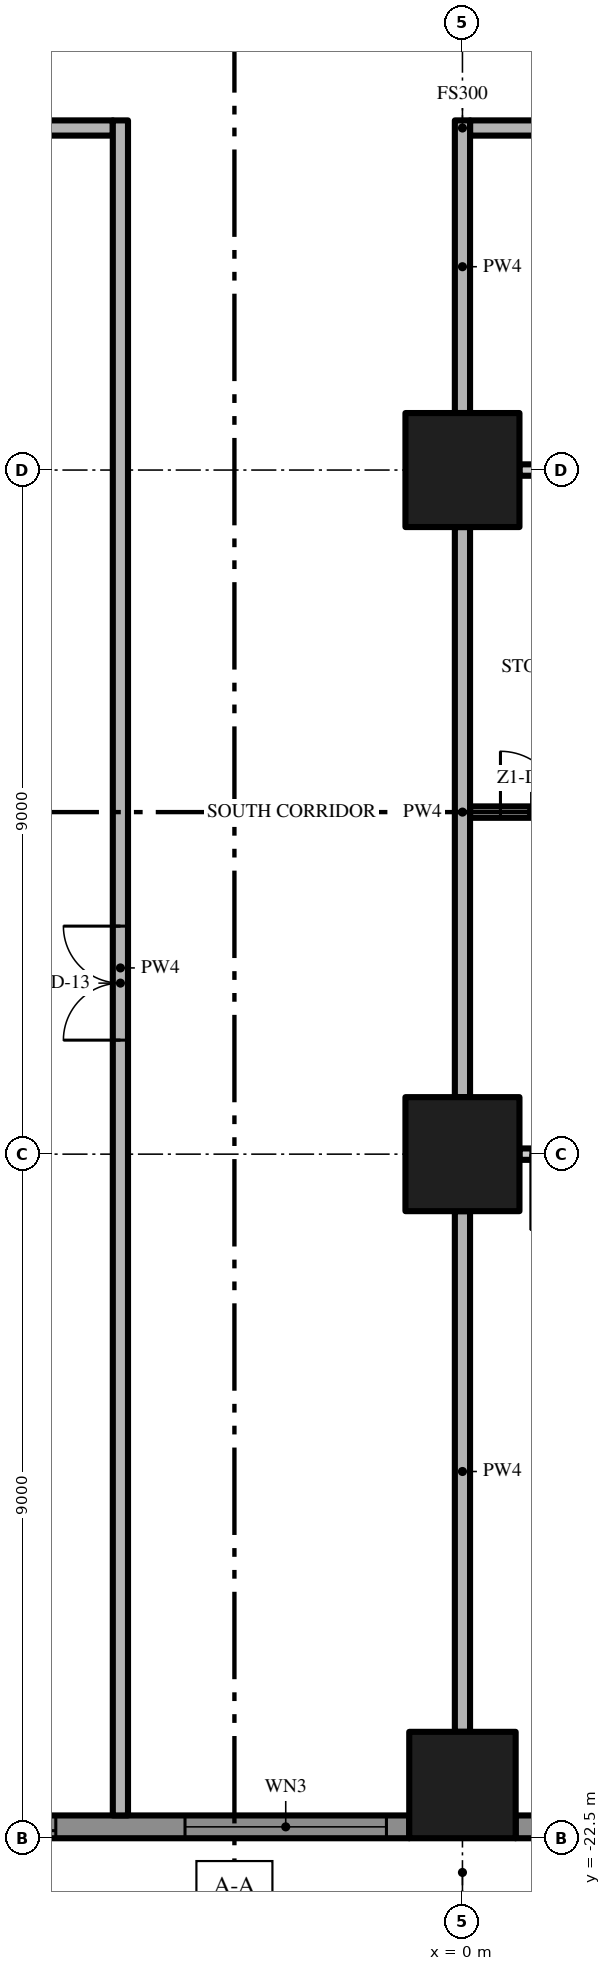
"""IFC4 building model, lengths in metres.
Left out: names, types, materials, properties, quantities, classifications, styles, units other than length and angle.
Written with IfcOpenShell. Run it as: python <this file> out.ifc"""

import sys

from ifc_helpers import new_model, si_unit, direction, frame, frame_2d, origin, origin_2d, place, context, subcontext, project, spatial, polyline, rectangle, outline, extrude, element, fill, save


model = new_model("IFC4")
c1 = context("Model", 3, precision=1e-05, world=origin(), true_north=direction((0.0, 1.0)))
c2 = subcontext(c1, "Body", "Model", "MODEL_VIEW")
j1 = project(units=[si_unit("LENGTHUNIT", "METRE"), si_unit("PLANEANGLEUNIT", "RADIAN")], contexts=[c1])
p1 = place(None, origin())
s1 = spatial("IfcSite", under=j1, at=p1, CompositionType="ELEMENT")
p2 = place(p1, origin())
s2 = spatial("IfcBuilding", under=s1, at=p2, CompositionType="ELEMENT")
p3 = place(p2, frame((0.0, 0.0, 49.2)))
s3 = spatial("IfcBuildingStorey", under=s2, at=p3, CompositionType="ELEMENT", Elevation=49.2)
p4 = place(p3, frame((0.0, -13.5, 0.0), z_axis=(0.0, 0.0, 1.0), x_axis=(1.0, 0.0, 0.0)))
e1 = element("IfcColumn", 1, at=p4, inside=s3, PredefinedType="COLUMN", context=c2, shape_type="SweptSolid", body=[
    extrude(rectangle(XDim=1.5, YDim=1.5, at=origin_2d()), origin(), (0.0, 0.0, 1.0), 3.5),
])
p5 = place(p3, frame((0.0, -21.8, 0.0), z_axis=(0.0, 0.0, 1.0), x_axis=(1.0, 0.0, 0.0)))
e2 = element("IfcColumn", 2, at=p5, inside=s3, PredefinedType="COLUMN", context=c2, shape_type="SweptSolid", body=[
    extrude(rectangle(XDim=1.4, YDim=1.4, at=origin_2d()), origin(), (0.0, 0.0, 1.0), 3.5),
])
p6 = place(p3, frame((0.0, -4.5, 0.0), z_axis=(0.0, 0.0, 1.0), x_axis=(1.0, 0.0, 0.0)))
e3 = element("IfcColumn", 3, at=p6, inside=s3, PredefinedType="COLUMN", context=c2, shape_type="SweptSolid", body=[
    extrude(rectangle(XDim=1.5, YDim=1.5, at=origin_2d()), origin(), (0.0, 0.0, 1.0), 3.5),
])
p7 = place(p3, frame((-0.7, -22.35, 0.0), z_axis=(0.0, 0.0, 1.0), x_axis=(-1.0, 0.0, 0.0)))
e4 = element("IfcWall", 4, at=p7, inside=s3, PredefinedType="SOLIDWALL", context=c2, shape_type="SweptSolid", body=[
    extrude(rectangle(XDim=7.6, YDim=0.3, at=frame_2d((3.8, 0.0))), origin(), (0.0, 0.0, 1.0), 3.5),
])
p8 = place(p7, frame((4.65, 0.0, 0.0)))
e5 = element("IfcOpeningElement", 5, at=p8, cuts=e4, PredefinedType="OPENING", context=c2, shape_type="SweptSolid", body=[
    extrude(rectangle(XDim=2.65, YDim=2.4, at=frame_2d((1.325, 1.2))), frame((0.0, 0.16, 0.0), z_axis=(0.0, -1.0, 0.0), x_axis=(1.0, 0.0, 0.0)), (0.0, 0.0, 1.0), 0.32),
])
p9 = place(p7, frame((0.3, 0.0, 0.45)))
e6 = element("IfcOpeningElement", 6, at=p9, cuts=e4, PredefinedType="OPENING", context=c2, shape_type="SweptSolid", body=[
    extrude(rectangle(XDim=2.65, YDim=2.65, at=frame_2d((1.325, 1.325))), frame((0.0, 0.16, 0.0), z_axis=(0.0, -1.0, 0.0), x_axis=(1.0, 0.0, 0.0)), (0.0, 0.0, 1.0), 0.32),
])
p10 = place(p3, frame((8.3, -22.35, 0.0), z_axis=(0.0, 0.0, 1.0), x_axis=(-1.0, 0.0, 0.0)))
e7 = element("IfcWall", 7, at=p10, inside=s3, PredefinedType="SOLIDWALL", context=c2, shape_type="SweptSolid", body=[
    extrude(rectangle(XDim=7.6, YDim=0.3, at=frame_2d((3.8, 0.0))), origin(), (0.0, 0.0, 1.0), 3.5),
])
p11 = place(p10, frame((4.65, 0.0, 0.45)))
e8 = element("IfcOpeningElement", 8, at=p11, cuts=e7, PredefinedType="OPENING", context=c2, shape_type="SweptSolid", body=[
    extrude(rectangle(XDim=2.65, YDim=2.65, at=frame_2d((1.325, 1.325))), frame((0.0, 0.16, 0.0), z_axis=(0.0, -1.0, 0.0), x_axis=(1.0, 0.0, 0.0)), (0.0, 0.0, 1.0), 0.32),
])
p12 = place(p10, frame((0.3, 0.0, 0.0)))
e9 = element("IfcOpeningElement", 9, at=p12, cuts=e7, PredefinedType="OPENING", context=c2, shape_type="SweptSolid", body=[
    extrude(rectangle(XDim=2.65, YDim=2.4, at=frame_2d((1.325, 1.2))), frame((0.0, 0.16, 0.0), z_axis=(0.0, -1.0, 0.0), x_axis=(1.0, 0.0, 0.0)), (0.0, 0.0, 1.0), 0.32),
])
p13 = place(p3, origin())
e10 = element("IfcWall", 10, at=p13, inside=s3, PredefinedType="USERDEFINED", context=c2, shape_type="SweptSolid", body=[
    extrude(outline(polyline([(-22.5, -25.149), (-21.0, -25.485), (-20.625, -25.5), (-19.5, -25.369), (-18.0, -24.845), (-16.5, -24.112), (-15.0, -23.451), (-13.5, -23.115), (-13.125, -23.1), (-12.0, -23.231), (-10.5, -23.755), (-9.0, -24.488), (-7.5, -25.149), (-6.0, -25.485), (-5.625, -25.5), (-4.5, -25.369), (-3.0, -24.845), (-1.5, -24.112), (0.0, -23.451), (1.5, -23.115), (1.875, -23.1), (3.0, -23.231), (4.5, -23.755), (6.0, -24.488), (7.5, -25.149), (9.0, -25.485), (9.375, -25.5), (10.5, -25.369), (12.0, -24.845), (13.5, -24.112), (15.0, -23.451), (16.5, -23.115), (16.875, -23.1), (18.0, -23.231), (19.5, -23.755), (21.0, -24.488), (22.5, -25.149), (22.601, -24.92), (21.105, -24.261), (19.596, -23.524), (18.056, -22.986), (16.885, -22.849), (16.467, -22.866), (14.921, -23.213), (13.395, -23.885), (11.904, -24.614), (10.444, -25.124), (9.365, -25.249), (9.033, -25.236), (7.579, -24.91), (6.105, -24.261), (4.596, -23.524), (3.056, -22.986), (1.885, -22.849), (1.467, -22.866), (-0.079, -23.213), (-1.605, -23.885), (-3.096, -24.614), (-4.556, -25.124), (-5.635, -25.249), (-5.967, -25.236), (-7.421, -24.91), (-8.895, -24.261), (-10.404, -23.524), (-11.944, -22.986), (-13.115, -22.849), (-13.533, -22.866), (-15.079, -23.213), (-16.605, -23.885), (-18.096, -24.614), (-19.556, -25.124), (-20.635, -25.249), (-20.967, -25.236), (-22.445, -24.905), (-22.5, -25.149)])), origin(), (0.0, 0.0, 1.0), 0.9),
])
p14 = place(p3, frame((8.25, -13.5, 0.0), z_axis=(0.0, 0.0, 1.0), x_axis=(-1.0, 0.0, 0.0)))
e11 = element("IfcWall", 11, at=p14, inside=s3, PredefinedType="PARTITIONING", context=c2, shape_type="SweptSolid", body=[
    extrude(rectangle(XDim=7.5, YDim=0.15, at=frame_2d((3.75, 0.0))), origin(), (0.0, 0.0, 1.0), 3.5),
])
p15 = place(p14, frame((0.15, 0.0, 0.0)))
e12 = element("IfcOpeningElement", 12, at=p15, cuts=e11, PredefinedType="OPENING", context=c2, shape_type="SweptSolid", body=[
    extrude(rectangle(XDim=1.0, YDim=2.4, at=frame_2d((0.5, 1.2))), frame((0.0, 0.085, 0.0), z_axis=(0.0, -1.0, 0.0), x_axis=(1.0, 0.0, 0.0)), (0.0, 0.0, 1.0), 0.17),
])
p16 = place(p14, frame((6.35, 0.0, 0.0)))
e13 = element("IfcOpeningElement", 13, at=p16, cuts=e11, PredefinedType="OPENING", context=c2, shape_type="SweptSolid", body=[
    extrude(rectangle(XDim=1.0, YDim=2.4, at=frame_2d((0.5, 1.2))), frame((0.0, 0.085, 0.0), z_axis=(0.0, -1.0, 0.0), x_axis=(1.0, 0.0, 0.0)), (0.0, 0.0, 1.0), 0.17),
])
p17 = place(p3, frame((0.1, -9.0, 0.0), z_axis=(0.0, 0.0, 1.0), x_axis=(1.0, 0.0, 0.0)))
e14 = element("IfcWall", 14, at=p17, inside=s3, PredefinedType="PARTITIONING", context=c2, shape_type="SweptSolid", body=[
    extrude(rectangle(XDim=10.625, YDim=0.15, at=frame_2d((5.312, 0.0))), origin(), (0.0, 0.0, 1.0), 3.5),
])
p18 = place(p17, frame((7.6, 0.0, 0.0)))
e15 = element("IfcOpeningElement", 15, at=p18, cuts=e14, PredefinedType="OPENING", context=c2, shape_type="SweptSolid", body=[
    extrude(rectangle(XDim=0.9, YDim=2.1, at=frame_2d((0.45, 1.05))), frame((0.0, 0.085, 0.0), z_axis=(0.0, -1.0, 0.0), x_axis=(1.0, 0.0, 0.0)), (0.0, 0.0, 1.0), 0.17),
])
p19 = place(p17, frame((0.4, 0.0, 0.0)))
e16 = element("IfcOpeningElement", 16, at=p19, cuts=e14, PredefinedType="OPENING", context=c2, shape_type="SweptSolid", body=[
    extrude(rectangle(XDim=0.8, YDim=2.0, at=frame_2d((0.4, 1.0))), frame((0.0, 0.085, 0.0), z_axis=(0.0, -1.0, 0.0), x_axis=(1.0, 0.0, 0.0)), (0.0, 0.0, 1.0), 0.17),
])
p20 = place(p3, frame((0.75, -4.5, 0.0), z_axis=(0.0, 0.0, 1.0), x_axis=(1.0, 0.0, 0.0)))
e17 = element("IfcWall", 17, at=p20, inside=s3, PredefinedType="PARTITIONING", context=c2, shape_type="SweptSolid", body=[
    extrude(rectangle(XDim=7.5, YDim=0.15, at=frame_2d((3.75, 0.0))), origin(), (0.0, 0.0, 1.0), 3.5),
])
p21 = place(p3, frame((-17.4, 0.0, 0.0), z_axis=(0.0, 0.0, 1.0), x_axis=(1.0, 0.0, 0.0)))
e18 = element("IfcWall", 18, at=p21, inside=s3, PredefinedType="PARTITIONING", context=c2, shape_type="SweptSolid", body=[
    extrude(rectangle(XDim=12.8, YDim=0.2, at=frame_2d((6.4, 0.0))), origin(), (0.0, 0.0, 1.0), 3.5),
])
p22 = place(p3, frame((17.4, 0.0, 0.0), z_axis=(0.0, 0.0, 1.0), x_axis=(-1.0, 0.0, 0.0)))
e19 = element("IfcWall", 19, at=p22, inside=s3, PredefinedType="PARTITIONING", context=c2, shape_type="SweptSolid", body=[
    extrude(rectangle(XDim=17.3, YDim=0.2, at=frame_2d((8.65, 0.0))), origin(), (0.0, 0.0, 1.0), 3.5),
])
p23 = place(p22, frame((7.65, 0.0, 0.0)))
e20 = element("IfcOpeningElement", 20, at=p23, cuts=e19, PredefinedType="OPENING", context=c2, shape_type="SweptSolid", body=[
    extrude(rectangle(XDim=1.5, YDim=2.4, at=frame_2d((0.75, 1.2))), frame((0.0, 0.11, 0.0), z_axis=(0.0, -1.0, 0.0), x_axis=(1.0, 0.0, 0.0)), (0.0, 0.0, 1.0), 0.22),
])
p24 = place(p3, frame((-4.5, -22.2, 0.0), z_axis=(0.0, 0.0, 1.0), x_axis=(0.0, 1.0, 0.0)))
e21 = element("IfcWall", 21, at=p24, inside=s3, PredefinedType="PARTITIONING", context=c2, shape_type="SweptSolid", body=[
    extrude(rectangle(XDim=22.3, YDim=0.2, at=frame_2d((11.15, 0.0))), origin(), (0.0, 0.0, 1.0), 3.5),
])
p25 = place(p24, frame((10.2, 0.0, 0.0)))
e22 = element("IfcOpeningElement", 22, at=p25, cuts=e21, PredefinedType="OPENING", context=c2, shape_type="SweptSolid", body=[
    extrude(rectangle(XDim=1.5, YDim=2.4, at=frame_2d((0.75, 1.2))), frame((0.0, 0.11, 0.0), z_axis=(0.0, -1.0, 0.0), x_axis=(1.0, 0.0, 0.0)), (0.0, 0.0, 1.0), 0.22),
])
p26 = place(p3, frame((0.0, -21.1, 0.0), z_axis=(0.0, 0.0, 1.0), x_axis=(0.0, 1.0, 0.0)))
e23 = element("IfcWall", 23, at=p26, inside=s3, PredefinedType="PARTITIONING", context=c2, shape_type="SweptSolid", body=[
    extrude(rectangle(XDim=6.85, YDim=0.2, at=frame_2d((3.425, 0.0))), origin(), (0.0, 0.0, 1.0), 3.5),
])
p27 = place(p3, frame((0.0, -12.75, 0.0), z_axis=(0.0, 0.0, 1.0), x_axis=(0.0, 1.0, 0.0)))
e24 = element("IfcWall", 24, at=p27, inside=s3, PredefinedType="PARTITIONING", context=c2, shape_type="SweptSolid", body=[
    extrude(rectangle(XDim=7.5, YDim=0.2, at=frame_2d((3.75, 0.0))), origin(), (0.0, 0.0, 1.0), 3.5),
])
p28 = place(p3, frame((0.0, -3.75, 0.0), z_axis=(0.0, 0.0, 1.0), x_axis=(0.0, 1.0, 0.0)))
e25 = element("IfcWall", 25, at=p28, inside=s3, PredefinedType="PARTITIONING", context=c2, shape_type="SweptSolid", body=[
    extrude(rectangle(XDim=3.85, YDim=0.2, at=frame_2d((1.925, 0.0))), origin(), (0.0, 0.0, 1.0), 3.5),
])
p29 = place(p8, origin())
e26 = element("IfcDoor", 26, at=p29, inside=s3, OperationType="SINGLE_SWING_LEFT", PredefinedType="DOOR", context=c2, shape_type="SweptSolid", body=[
    extrude(rectangle(XDim=2.65, YDim=2.4, at=frame_2d((1.325, 1.2))), frame((0.0, 0.025, 0.0), z_axis=(0.0, -1.0, 0.0), x_axis=(1.0, 0.0, 0.0)), (0.0, 0.0, 1.0), 0.05),
])
fill(e5, e26)
p30 = place(p9, origin())
e27 = element("IfcWindow", 27, at=p30, inside=s3, PartitioningType="SINGLE_PANEL", PredefinedType="WINDOW", context=c2, shape_type="SweptSolid", body=[
    extrude(rectangle(XDim=2.65, YDim=2.65, at=frame_2d((1.325, 1.325))), frame((0.0, 0.03, 0.0), z_axis=(0.0, -1.0, 0.0), x_axis=(1.0, 0.0, 0.0)), (0.0, 0.0, 1.0), 0.06),
])
fill(e6, e27)
p31 = place(p25, origin())
e28 = element("IfcDoor", 28, at=p31, inside=s3, OperationType="DOUBLE_DOOR_SINGLE_SWING", PredefinedType="DOOR", context=c2, shape_type="SweptSolid", body=[
    extrude(rectangle(XDim=1.5, YDim=2.4, at=frame_2d((0.75, 1.2))), frame((0.0, 0.025, 0.0), z_axis=(0.0, -1.0, 0.0), x_axis=(1.0, 0.0, 0.0)), (0.0, 0.0, 1.0), 0.05),
])
fill(e22, e28)
p32 = place(p19, origin())
e29 = element("IfcDoor", 29, at=p32, inside=s3, OperationType="SINGLE_SWING_LEFT", PredefinedType="DOOR", context=c2, shape_type="SweptSolid", body=[
    extrude(rectangle(XDim=0.8, YDim=2.0, at=frame_2d((0.4, 1.0))), frame((0.0, 0.025, 0.0), z_axis=(0.0, -1.0, 0.0), x_axis=(1.0, 0.0, 0.0)), (0.0, 0.0, 1.0), 0.05),
])
fill(e16, e29)
save(model, sys.argv[1])
